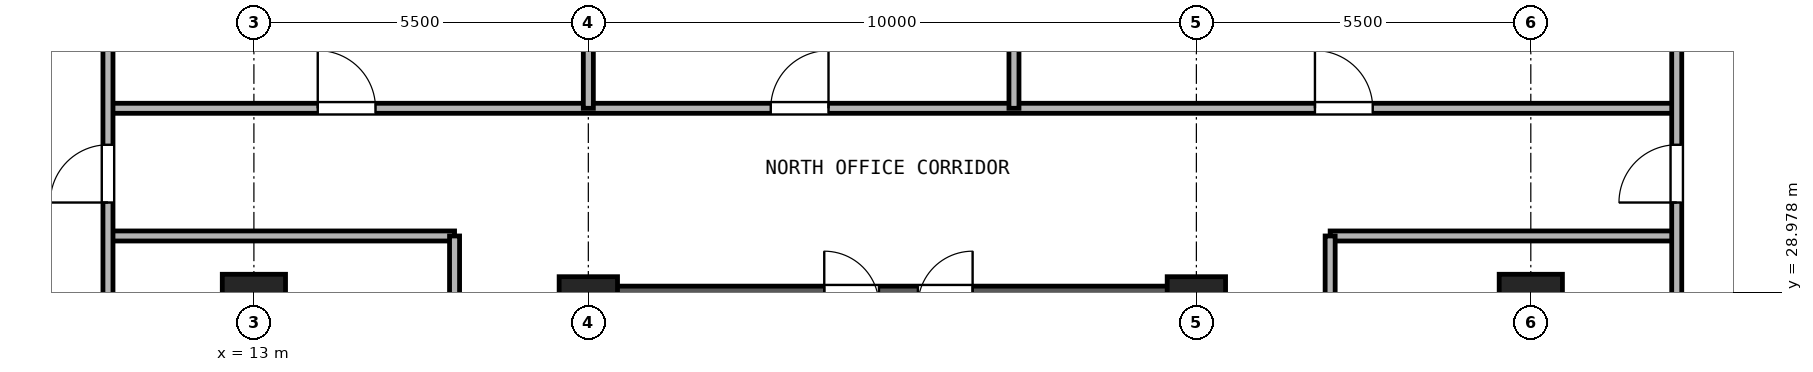
"""IFC4 building model, lengths in metres.
Left out: names, types, materials, properties, quantities, classifications, styles, units other than length and angle.
Written with IfcOpenShell. Run it as: python <this file> out.ifc"""

import sys

from ifc_helpers import new_model, si_unit, direction, frame, frame_2d, origin, origin_2d, place, context, subcontext, project, spatial, rectangle, hollow_rectangle, extrude, source, transform, mapped, element, fill, save


model = new_model("IFC4")
c1 = context("Model", 3, precision=1e-05, world=origin(), true_north=direction((0.0, 1.0)))
c2 = subcontext(c1, "Body", "Model", "MODEL_VIEW")
j1 = project(units=[si_unit("LENGTHUNIT", "METRE"), si_unit("PLANEANGLEUNIT", "RADIAN")], contexts=[c1])
p1 = place(None, origin())
s1 = spatial("IfcSite", under=j1, at=p1, CompositionType="ELEMENT")
p2 = place(p1, origin())
s2 = spatial("IfcBuilding", under=s1, at=p2, CompositionType="ELEMENT")
p3 = place(p2, frame((0.0, 0.0, 44.1)))
s3 = spatial("IfcBuildingStorey", under=s2, at=p3, CompositionType="ELEMENT", Elevation=44.1)
m1 = source(origin(), c2, "Body", "SweptSolid", [
    extrude(hollow_rectangle(XDim=1.04, YDim=1.04, WallThickness=0.065, at=origin_2d()), origin(), (0.0, 0.0, 1.0), 3.32),
])
p4 = place(p3, frame((13.0, 28.75, 0.0), z_axis=(0.0, 0.0, 1.0), x_axis=(1.0, 0.0, 0.0)))
e1 = element("IfcColumn", 1, at=p4, inside=s3, PredefinedType="COLUMN", context=c2, shape_type="MappedRepresentation", body=[
    mapped(m1, transform((0.0, 0.0, 0.0), x_axis=(1.0, 0.0, 0.0), y_axis=(0.0, 1.0, 0.0), z_axis=(0.0, 0.0, 1.0), scale=1.0)),
])
m2 = source(origin(), c2, "Body", "SweptSolid", [
    extrude(hollow_rectangle(XDim=0.96, YDim=0.96, WallThickness=0.06, at=origin_2d()), origin(), (0.0, 0.0, 1.0), 3.32),
])
for number, where, z_axis, x_axis in (
    (2, (18.5, 28.75, 0.0), (0.0, 0.0, 1.0), (1.0, 0.0, 0.0)),
    (3, (28.5, 28.75, 0.0), (0.0, 0.0, 1.0), (1.0, 0.0, 0.0)),
):
    element("IfcColumn", number, at=place(p3, frame(where, z_axis=z_axis, x_axis=x_axis)), inside=s3, PredefinedType="COLUMN", context=c2, shape_type="MappedRepresentation", body=[
        mapped(m2, transform((0.0, 0.0, 0.0), x_axis=(1.0, 0.0, 0.0), y_axis=(0.0, 1.0, 0.0), z_axis=(0.0, 0.0, 1.0), scale=1.0)),
    ])
p5 = place(p3, frame((34.0, 28.75, 0.0), z_axis=(0.0, 0.0, 1.0), x_axis=(1.0, 0.0, 0.0)))
e4 = element("IfcColumn", 4, at=p5, inside=s3, PredefinedType="COLUMN", context=c2, shape_type="MappedRepresentation", body=[
    mapped(m1, transform((0.0, 0.0, 0.0), x_axis=(1.0, 0.0, 0.0), y_axis=(0.0, 1.0, 0.0), z_axis=(0.0, 0.0, 1.0), scale=1.0)),
])
p6 = place(p3, frame((18.175, 28.75, 0.0), z_axis=(0.0, 0.0, 1.0), x_axis=(1.0, 0.0, 0.0)))
e5 = element("IfcWall", 5, at=p6, inside=s3, PredefinedType="SHEAR", context=c2, shape_type="SweptSolid", body=[
    extrude(rectangle(XDim=10.65, YDim=0.65, at=frame_2d((5.325, 0.0))), origin(), (0.0, 0.0, 1.0), 3.32),
])
p7 = place(p6, frame((4.205, 0.0, 0.0)))
e6 = element("IfcOpeningElement", 6, at=p7, cuts=e5, PredefinedType="OPENING", context=c2, shape_type="SweptSolid", body=[
    extrude(rectangle(XDim=0.9, YDim=2.05, at=frame_2d((0.45, 1.025))), frame((0.0, 0.335, 0.0), z_axis=(0.0, -1.0, 0.0), x_axis=(1.0, 0.0, 0.0)), (0.0, 0.0, 1.0), 0.67),
])
p8 = place(p6, frame((5.745, 0.0, 0.0)))
e7 = element("IfcOpeningElement", 7, at=p8, cuts=e5, PredefinedType="OPENING", context=c2, shape_type="SweptSolid", body=[
    extrude(rectangle(XDim=0.9, YDim=2.05, at=frame_2d((0.45, 1.025))), frame((0.0, 0.335, 0.0), z_axis=(0.0, -1.0, 0.0), x_axis=(1.0, 0.0, 0.0)), (0.0, 0.0, 1.0), 0.67),
])
p9 = place(p3, frame((10.6, 32.0, 0.0), z_axis=(0.0, 0.0, 1.0), x_axis=(1.0, 0.0, 0.0)))
e8 = element("IfcWall", 8, at=p9, inside=s3, PredefinedType="PARTITIONING", context=c2, shape_type="SweptSolid", body=[
    extrude(rectangle(XDim=25.8, YDim=0.165, at=frame_2d((12.9, 0.0))), origin(), (0.0, 0.0, 1.0), 3.32),
])
p10 = place(p9, frame((3.45, 0.0, 0.0)))
e9 = element("IfcOpeningElement", 9, at=p10, cuts=e8, PredefinedType="OPENING", context=c2, shape_type="SweptSolid", body=[
    extrude(rectangle(XDim=0.95, YDim=2.15, at=frame_2d((0.475, 1.075))), frame((0.0, 0.093, 0.0), z_axis=(0.0, -1.0, 0.0), x_axis=(1.0, 0.0, 0.0)), (0.0, 0.0, 1.0), 0.185),
])
p11 = place(p9, frame((10.9, 0.0, 0.0)))
e10 = element("IfcOpeningElement", 10, at=p11, cuts=e8, PredefinedType="OPENING", context=c2, shape_type="SweptSolid", body=[
    extrude(rectangle(XDim=0.95, YDim=2.15, at=frame_2d((0.475, 1.075))), frame((0.0, 0.093, 0.0), z_axis=(0.0, -1.0, 0.0), x_axis=(1.0, 0.0, 0.0)), (0.0, 0.0, 1.0), 0.185),
])
p12 = place(p9, frame((19.85, 0.0, 0.0)))
e11 = element("IfcOpeningElement", 11, at=p12, cuts=e8, PredefinedType="OPENING", context=c2, shape_type="SweptSolid", body=[
    extrude(rectangle(XDim=0.95, YDim=2.15, at=frame_2d((0.475, 1.075))), frame((0.0, 0.093, 0.0), z_axis=(0.0, -1.0, 0.0), x_axis=(1.0, 0.0, 0.0)), (0.0, 0.0, 1.0), 0.185),
])
for number, where, z_axis, x_axis in (
    (12, (10.6, 29.9, 0.0), (0.0, 0.0, 1.0), (1.0, 0.0, 0.0)),
    (13, (30.7, 29.9, 0.0), (0.0, 0.0, 1.0), (1.0, 0.0, 0.0)),
):
    element("IfcWall", number, at=place(p3, frame(where, z_axis=z_axis, x_axis=x_axis)), inside=s3, PredefinedType="PARTITIONING", context=c2, shape_type="SweptSolid", body=[
        extrude(rectangle(XDim=5.7, YDim=0.165, at=frame_2d((2.85, 0.0))), origin(), (0.0, 0.0, 1.0), 3.32),
    ])
p13 = place(p3, frame((16.3, 10.2, 0.0), z_axis=(0.0, 0.0, 1.0), x_axis=(0.0, 1.0, 0.0)))
e14 = element("IfcWall", 14, at=p13, inside=s3, PredefinedType="PARTITIONING", context=c2, shape_type="SweptSolid", body=[
    extrude(rectangle(XDim=19.7, YDim=0.165, at=frame_2d((9.85, 0.0))), origin(), (0.0, 0.0, 1.0), 3.32),
])
p14 = place(p13, frame((5.859, 0.0, 0.0)))
e15 = element("IfcOpeningElement", 15, at=p14, cuts=e14, PredefinedType="OPENING", context=c2, shape_type="SweptSolid", body=[
    extrude(rectangle(XDim=0.95, YDim=2.15, at=frame_2d((0.475, 1.075))), frame((0.0, 0.093, 0.0), z_axis=(0.0, -1.0, 0.0), x_axis=(1.0, 0.0, 0.0)), (0.0, 0.0, 1.0), 0.185),
])
p15 = place(p13, frame((15.709, 0.0, 0.0)))
e16 = element("IfcOpeningElement", 16, at=p15, cuts=e14, PredefinedType="OPENING", context=c2, shape_type="SweptSolid", body=[
    extrude(rectangle(XDim=0.95, YDim=2.15, at=frame_2d((0.475, 1.075))), frame((0.0, 0.093, 0.0), z_axis=(0.0, -1.0, 0.0), x_axis=(1.0, 0.0, 0.0)), (0.0, 0.0, 1.0), 0.185),
])
p16 = place(p3, frame((30.7, 10.2, 0.0), z_axis=(0.0, 0.0, 1.0), x_axis=(0.0, 1.0, 0.0)))
e17 = element("IfcWall", 17, at=p16, inside=s3, PredefinedType="PARTITIONING", context=c2, shape_type="SweptSolid", body=[
    extrude(rectangle(XDim=19.7, YDim=0.165, at=frame_2d((9.85, 0.0))), origin(), (0.0, 0.0, 1.0), 3.32),
])
p17 = place(p16, frame((9.35, 0.0, 0.0)))
e18 = element("IfcOpeningElement", 18, at=p17, cuts=e17, PredefinedType="OPENING", context=c2, shape_type="SweptSolid", body=[
    extrude(rectangle(XDim=0.95, YDim=2.15, at=frame_2d((0.475, 1.075))), frame((0.0, 0.093, 0.0), z_axis=(0.0, -1.0, 0.0), x_axis=(1.0, 0.0, 0.0)), (0.0, 0.0, 1.0), 0.185),
])
p18 = place(p3, frame((10.6, 0.16, 0.0), z_axis=(0.0, 0.0, 1.0), x_axis=(0.0, 1.0, 0.0)))
e19 = element("IfcWall", 19, at=p18, inside=s3, PredefinedType="PARTITIONING", context=c2, shape_type="SweptSolid", body=[
    extrude(rectangle(XDim=40.18, YDim=0.165, at=frame_2d((20.09, 0.0))), origin(), (0.0, 0.0, 1.0), 3.32),
])
p19 = place(p18, frame((8.49, 0.0, 0.0)))
e20 = element("IfcOpeningElement", 20, at=p19, cuts=e19, PredefinedType="OPENING", context=c2, shape_type="SweptSolid", body=[
    extrude(rectangle(XDim=0.95, YDim=2.15, at=frame_2d((0.475, 1.075))), frame((0.0, 0.093, 0.0), z_axis=(0.0, -1.0, 0.0), x_axis=(1.0, 0.0, 0.0)), (0.0, 0.0, 1.0), 0.185),
])
p20 = place(p18, frame((30.29, 0.0, 0.0)))
e21 = element("IfcOpeningElement", 21, at=p20, cuts=e19, PredefinedType="OPENING", context=c2, shape_type="SweptSolid", body=[
    extrude(rectangle(XDim=0.95, YDim=2.15, at=frame_2d((0.475, 1.075))), frame((0.0, 0.093, 0.0), z_axis=(0.0, -1.0, 0.0), x_axis=(1.0, 0.0, 0.0)), (0.0, 0.0, 1.0), 0.185),
])
p21 = place(p3, frame((36.4, 0.16, 0.0), z_axis=(0.0, 0.0, 1.0), x_axis=(0.0, 1.0, 0.0)))
e22 = element("IfcWall", 22, at=p21, inside=s3, PredefinedType="PARTITIONING", context=c2, shape_type="SweptSolid", body=[
    extrude(rectangle(XDim=40.18, YDim=0.165, at=frame_2d((20.09, 0.0))), origin(), (0.0, 0.0, 1.0), 3.32),
])
p22 = place(p21, frame((8.49, 0.0, 0.0)))
e23 = element("IfcOpeningElement", 23, at=p22, cuts=e22, PredefinedType="OPENING", context=c2, shape_type="SweptSolid", body=[
    extrude(rectangle(XDim=0.95, YDim=2.15, at=frame_2d((0.475, 1.075))), frame((0.0, 0.093, 0.0), z_axis=(0.0, -1.0, 0.0), x_axis=(1.0, 0.0, 0.0)), (0.0, 0.0, 1.0), 0.185),
])
p23 = place(p21, frame((30.29, 0.0, 0.0)))
e24 = element("IfcOpeningElement", 24, at=p23, cuts=e22, PredefinedType="OPENING", context=c2, shape_type="SweptSolid", body=[
    extrude(rectangle(XDim=0.95, YDim=2.15, at=frame_2d((0.475, 1.075))), frame((0.0, 0.093, 0.0), z_axis=(0.0, -1.0, 0.0), x_axis=(1.0, 0.0, 0.0)), (0.0, 0.0, 1.0), 0.185),
])
p24 = place(p3, frame((18.5, 32.0, 0.0), z_axis=(0.0, 0.0, 1.0), x_axis=(0.0, 1.0, 0.0)))
e25 = element("IfcWall", 25, at=p24, inside=s3, PredefinedType="PARTITIONING", context=c2, shape_type="SweptSolid", body=[
    extrude(rectangle(XDim=8.34, YDim=0.165, at=frame_2d((4.17, 0.0))), origin(), (0.0, 0.0, 1.0), 2.539),
])
p25 = place(p3, frame((25.5, 32.0, 0.0), z_axis=(0.0, 0.0, 1.0), x_axis=(0.0, 1.0, 0.0)))
e26 = element("IfcWall", 26, at=p25, inside=s3, PredefinedType="PARTITIONING", context=c2, shape_type="SweptSolid", body=[
    extrude(rectangle(XDim=8.34, YDim=0.165, at=frame_2d((4.17, 0.0))), origin(), (0.0, 0.0, 1.0), 3.32),
])
p26 = place(p10, origin())
e27 = element("IfcDoor", 27, at=p26, inside=s3, OperationType="SINGLE_SWING_LEFT", PredefinedType="DOOR", context=c2, shape_type="SweptSolid", body=[
    extrude(rectangle(XDim=0.95, YDim=2.15, at=frame_2d((0.475, 1.075))), frame((0.0, 0.025, 0.0), z_axis=(0.0, -1.0, 0.0), x_axis=(1.0, 0.0, 0.0)), (0.0, 0.0, 1.0), 0.05),
])
fill(e9, e27)
p27 = place(p11, origin())
e28 = element("IfcDoor", 28, at=p27, inside=s3, OperationType="SINGLE_SWING_RIGHT", PredefinedType="DOOR", context=c2, shape_type="SweptSolid", body=[
    extrude(rectangle(XDim=0.95, YDim=2.15, at=frame_2d((0.475, 1.075))), frame((0.0, 0.025, 0.0), z_axis=(0.0, -1.0, 0.0), x_axis=(1.0, 0.0, 0.0)), (0.0, 0.0, 1.0), 0.05),
])
fill(e10, e28)
p28 = place(p12, origin())
e29 = element("IfcDoor", 29, at=p28, inside=s3, OperationType="SINGLE_SWING_LEFT", PredefinedType="DOOR", context=c2, shape_type="SweptSolid", body=[
    extrude(rectangle(XDim=0.95, YDim=2.15, at=frame_2d((0.475, 1.075))), frame((0.0, 0.025, 0.0), z_axis=(0.0, -1.0, 0.0), x_axis=(1.0, 0.0, 0.0)), (0.0, 0.0, 1.0), 0.05),
])
fill(e11, e29)
p29 = place(p20, frame((0.95, 0.0, 0.0), z_axis=(0.0, 0.0, 1.0), x_axis=(-1.0, 0.0, 0.0)))
e30 = element("IfcDoor", 30, at=p29, inside=s3, OperationType="SINGLE_SWING_LEFT", PredefinedType="DOOR", context=c2, shape_type="SweptSolid", body=[
    extrude(rectangle(XDim=0.95, YDim=2.15, at=frame_2d((0.475, 1.075))), frame((0.0, 0.025, 0.0), z_axis=(0.0, -1.0, 0.0), x_axis=(1.0, 0.0, 0.0)), (0.0, 0.0, 1.0), 0.05),
])
fill(e21, e30)
p30 = place(p23, origin())
e31 = element("IfcDoor", 31, at=p30, inside=s3, OperationType="SINGLE_SWING_LEFT", PredefinedType="DOOR", context=c2, shape_type="SweptSolid", body=[
    extrude(rectangle(XDim=0.95, YDim=2.15, at=frame_2d((0.475, 1.075))), frame((0.0, 0.025, 0.0), z_axis=(0.0, -1.0, 0.0), x_axis=(1.0, 0.0, 0.0)), (0.0, 0.0, 1.0), 0.05),
])
fill(e24, e31)
save(model, sys.argv[1])
